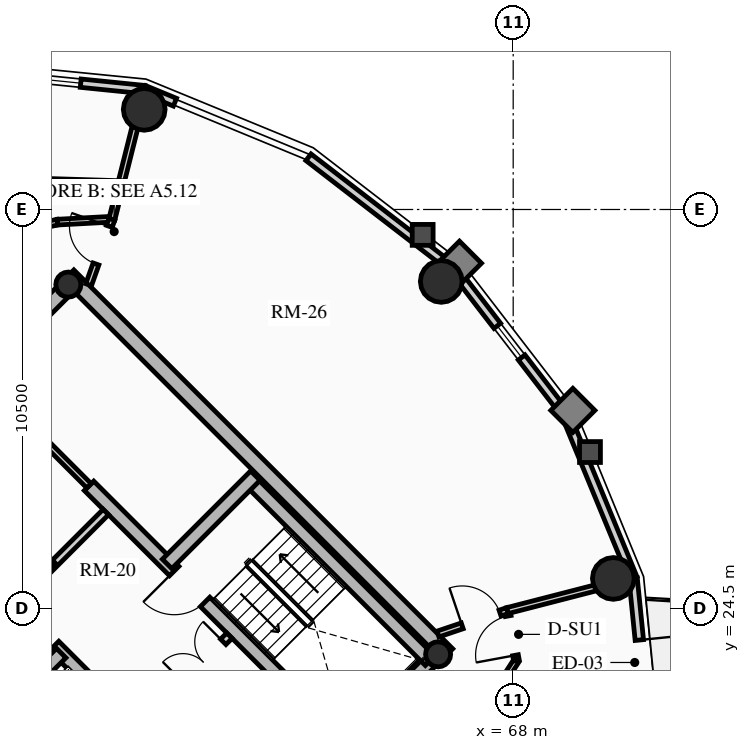
"""IFC4 building model, lengths in metres.
Left out: names, types, materials, properties, quantities, classifications, styles, units other than length and angle.
Written with IfcOpenShell. Run it as: python <this file> out.ifc"""

import sys

from ifc_helpers import new_model, si_unit, direction, frame, frame_2d, origin, origin_2d, place, context, subcontext, project, spatial, rectangle, circle, hollow_circle, extrude, source, transform, mapped, element, fill, save


model = new_model("IFC4")
c1 = context("Model", 3, precision=1e-05, world=origin(), true_north=direction((0.0, 1.0)))
c2 = subcontext(c1, "Body", "Model", "MODEL_VIEW")
j1 = project(units=[si_unit("LENGTHUNIT", "METRE"), si_unit("PLANEANGLEUNIT", "RADIAN")], contexts=[c1])
p1 = place(None, origin())
s1 = spatial("IfcSite", under=j1, at=p1, CompositionType="ELEMENT")
p2 = place(p1, origin())
s2 = spatial("IfcBuilding", under=s1, at=p2, CompositionType="ELEMENT")
p3 = place(p2, frame((0.0, 0.0, 214.12)))
s3 = spatial("IfcBuildingStorey", under=s2, at=p3, CompositionType="ELEMENT", Elevation=214.12)
for number, where, z_axis, x_axis in (
    (1, (58.702, 15.732, 0.0), (0.0, 0.0, 1.0), (-0.707, 0.707, 0.0)),
    (2, (66.268, 23.298, 0.0), (0.0, 0.0, 1.0), (-0.707, 0.707, 0.0)),
):
    element("IfcWall", number, at=place(p3, frame(where, z_axis=z_axis, x_axis=x_axis)), inside=s3, PredefinedType="SHEAR", context=c2, shape_type="SweptSolid", body=[
        extrude(rectangle(XDim=14.1, YDim=0.4, at=frame_2d((7.05, 0.0))), origin(), (0.0, 0.0, 1.0), 2.91),
    ])
p4 = place(p3, frame((58.561, 15.873, 0.0), z_axis=(0.0, 0.0, 1.0), x_axis=(0.707106781187, 0.707106781187, 0.0)))
e3 = element("IfcWall", 3, at=p4, inside=s3, PredefinedType="SHEAR", context=c2, shape_type="SweptSolid", body=[
    extrude(rectangle(XDim=10.7, YDim=0.4, at=frame_2d((5.35, 0.0))), origin(), (0.0, 0.0, 1.0), 2.91),
])
m1 = source(origin(), c2, "Body", "SweptSolid", [
    extrude(rectangle(XDim=1.5, YDim=2.02, at=frame_2d((0.75, 1.01))), frame((0.0, 0.21, 0.0), z_axis=(0.0, -1.0, 0.0), x_axis=(1.0, 0.0, 0.0)), (0.0, 0.0, 1.0), 0.42),
])
p5 = place(p4, frame((5.45, 0.0, 0.0)))
e4 = element("IfcOpeningElement", 4, at=p5, cuts=e3, PredefinedType="OPENING", context=c2, shape_type="MappedRepresentation", body=[
    mapped(m1, transform((0.0, 0.0, 0.0), x_axis=(1.0, 0.0, 0.0), y_axis=(0.0, 1.0, 0.0), z_axis=(0.0, 0.0, 1.0), scale=1.0)),
])
p6 = place(p3, frame((48.873, 25.561, 0.0), z_axis=(0.0, 0.0, 1.0), x_axis=(0.707106781187, 0.707106781187, 0.0)))
e5 = element("IfcWall", 5, at=p6, inside=s3, PredefinedType="SHEAR", context=c2, shape_type="SweptSolid", body=[
    extrude(rectangle(XDim=10.7, YDim=0.4, at=frame_2d((5.35, 0.0))), origin(), (0.0, 0.0, 1.0), 2.91),
])
p7 = place(p6, frame((4.6, 0.0, 0.0)))
e6 = element("IfcOpeningElement", 6, at=p7, cuts=e5, PredefinedType="OPENING", context=c2, shape_type="MappedRepresentation", body=[
    mapped(m1, transform((0.0, 0.0, 0.0), x_axis=(1.0, 0.0, 0.0), y_axis=(0.0, 1.0, 0.0), z_axis=(0.0, 0.0, 1.0), scale=1.0)),
])
p8 = place(p3, frame((61.06, 18.373, 0.0), z_axis=(0.0, 0.0, 1.0), x_axis=(-0.707106781187, 0.707106781187, 0.0)))
e7 = element("IfcWall", 7, at=p8, inside=s3, PredefinedType="SHEAR", context=c2, shape_type="SweptSolid", body=[
    extrude(rectangle(XDim=13.7, YDim=0.35, at=frame_2d((6.85, 0.0))), origin(), (0.0, 0.0, 1.0), 2.91),
])
m2 = source(origin(), c2, "Body", "SweptSolid", [
    extrude(rectangle(XDim=1.1, YDim=2.015, at=frame_2d((0.55, 1.007))), frame((0.0, 0.185, 0.0), z_axis=(0.0, -1.0, 0.0), x_axis=(1.0, 0.0, 0.0)), (0.0, 0.0, 1.0), 0.37),
])
p9 = place(p8, frame((4.85, 0.0, 0.0)))
e8 = element("IfcOpeningElement", 8, at=p9, cuts=e7, PredefinedType="OPENING", context=c2, shape_type="MappedRepresentation", body=[
    mapped(m2, transform((0.0, 0.0, 0.0), x_axis=(1.0, 0.0, 0.0), y_axis=(0.0, 1.0, 0.0), z_axis=(0.0, 0.0, 1.0), scale=1.0)),
])
p10 = place(p8, frame((0.625, 0.0, 0.0)))
e9 = element("IfcOpeningElement", 9, at=p10, cuts=e7, PredefinedType="OPENING", context=c2, shape_type="MappedRepresentation", body=[
    mapped(m2, transform((0.0, 0.0, 0.0), x_axis=(1.0, 0.0, 0.0), y_axis=(0.0, 1.0, 0.0), z_axis=(0.0, 0.0, 1.0), scale=1.0)),
])
p11 = place(p8, frame((2.625, 0.0, 0.0)))
e10 = element("IfcOpeningElement", 10, at=p11, cuts=e7, PredefinedType="OPENING", context=c2, shape_type="MappedRepresentation", body=[
    mapped(m2, transform((0.0, 0.0, 0.0), x_axis=(1.0, 0.0, 0.0), y_axis=(0.0, 1.0, 0.0), z_axis=(0.0, 0.0, 1.0), scale=1.0)),
])
m3 = source(origin(), c2, "Body", "SweptSolid", [
    extrude(rectangle(XDim=1.15, YDim=2.02, at=frame_2d((0.575, 1.01))), frame((0.0, 0.185, 0.0), z_axis=(0.0, -1.0, 0.0), x_axis=(1.0, 0.0, 0.0)), (0.0, 0.0, 1.0), 0.37),
])
p12 = place(p8, frame((7.27, 0.0, 0.0)))
e11 = element("IfcOpeningElement", 11, at=p12, cuts=e7, PredefinedType="OPENING", context=c2, shape_type="MappedRepresentation", body=[
    mapped(m3, transform((0.0, 0.0, 0.0), x_axis=(1.0, 0.0, 0.0), y_axis=(0.0, 1.0, 0.0), z_axis=(0.0, 0.0, 1.0), scale=1.0)),
])
p13 = place(p3, frame((63.627, 20.94, 0.0), z_axis=(0.0, 0.0, 1.0), x_axis=(-0.707119496762, 0.707094065383, 0.0)))
e12 = element("IfcWall", 12, at=p13, inside=s3, PredefinedType="SHEAR", context=c2, shape_type="SweptSolid", body=[
    extrude(rectangle(XDim=9.6, YDim=0.35, at=frame_2d((4.8, 0.0))), origin(), (0.0, 0.0, 1.0), 2.91),
])
p14 = place(p13, frame((5.28, 0.0, 0.0)))
e13 = element("IfcOpeningElement", 13, at=p14, cuts=e12, PredefinedType="OPENING", context=c2, shape_type="MappedRepresentation", body=[
    mapped(m3, transform((0.0, 0.0, 0.0), x_axis=(1.0, 0.0, 0.0), y_axis=(0.0, 1.0, 0.0), z_axis=(0.0, 0.0, 1.0), scale=1.0)),
])
p15 = place(p3, frame((53.784, 21.003, 0.0), z_axis=(0.0, 0.0, 1.0), x_axis=(0.707106781187, 0.707106781187, 0.0)))
e14 = element("IfcWall", 14, at=p15, inside=s3, PredefinedType="SHEAR", context=c2, shape_type="SweptSolid", body=[
    extrude(rectangle(XDim=3.285, YDim=0.35, at=frame_2d((1.643, 0.0))), origin(), (0.0, 0.0, 1.0), 2.91),
])
p16 = place(p3, frame((65.812, 23.125, 0.0), z_axis=(0.0, 0.0, 1.0), x_axis=(-0.707106781187, 0.707106781187, 0.0)))
e15 = element("IfcWall", 15, at=p16, inside=s3, PredefinedType="SHEAR", context=c2, shape_type="SweptSolid", body=[
    extrude(rectangle(XDim=6.695, YDim=0.35, at=frame_2d((3.348, 0.0))), origin(), (0.0, 0.0, 1.0), 2.91),
])
p17 = place(p3, frame((58.893, 25.674, 0.0), z_axis=(0.0, 0.0, 1.0), x_axis=(0.707106781187, 0.707106781187, 0.0)))
e16 = element("IfcWall", 16, at=p17, inside=s3, PredefinedType="SHEAR", context=c2, shape_type="SweptSolid", body=[
    extrude(rectangle(XDim=3.285, YDim=0.35, at=frame_2d((1.643, 0.0))), origin(), (0.0, 0.0, 1.0), 2.91),
])
for number, where, z_axis, x_axis in (
    (17, (66.024, 23.294, 0.0), (0.0, 0.0, 1.0), (0.707, 0.707, 0.0)),
    (18, (56.294, 33.024, 0.0), (0.0, 0.0, 1.0), (0.707, 0.707, 0.0)),
):
    element("IfcColumn", number, at=place(p3, frame(where, z_axis=z_axis, x_axis=x_axis)), inside=s3, PredefinedType="COLUMN", context=c2, shape_type="SweptSolid", body=[
        extrude(hollow_circle(Radius=0.33, WallThickness=0.025, at=origin_2d()), origin(), (0.0, 0.0, 1.0), 2.91),
    ])
for number, where, z_axis, x_axis in (
    (19, (66.107, 33.107, 0.0), (0.0, 0.0, 1.0), (1.0, 0.0, 0.0)),
    (20, (58.291, 37.635, 0.0), (0.0, 0.0, 1.0), (1.0, 0.0, 0.0)),
    (21, (70.635, 25.291, 0.0), (0.0, 0.0, 1.0), (1.0, 0.0, 0.0)),
):
    element("IfcColumn", number, at=place(p3, frame(where, z_axis=z_axis, x_axis=x_axis)), inside=s3, PredefinedType="USERDEFINED", context=c2, shape_type="SweptSolid", body=[
        extrude(circle(Radius=0.55, at=origin_2d()), origin(), (0.0, 0.0, 1.0), 2.91),
    ])
p18 = place(p3, frame((62.613, 36.374, 0.0), z_axis=(0.0, 0.0, 1.0), x_axis=(0.791998462147, -0.610523083886, 0.0)))
e22 = element("IfcWall", 22, at=p18, inside=s3, PredefinedType="SOLIDWALL", context=c2, shape_type="SweptSolid", body=[
    extrude(rectangle(XDim=4.82, YDim=0.22, at=frame_2d((2.41, 0.0))), origin(), (0.0, 0.0, 1.0), 2.322),
])
p19 = place(p3, frame((58.295, 38.155, 0.0), z_axis=(0.0, 0.0, 1.0), x_axis=(0.924515260676, -0.381145028536, 0.0)))
e23 = element("IfcWall", 23, at=p19, inside=s3, PredefinedType="SOLIDWALL", context=c2, shape_type="SweptSolid", body=[
    extrude(rectangle(XDim=0.87, YDim=0.22, at=frame_2d((0.435, 0.0))), origin(), (0.0, 0.0, 1.0), 2.322),
])
p20 = place(p3, frame((53.9, 38.599, 0.0), z_axis=(0.0, 0.0, 1.0), x_axis=(0.994929930991, -0.100570534541, 0.0)))
e24 = element("IfcWall", 24, at=p20, inside=s3, PredefinedType="SOLIDWALL", context=c2, shape_type="SweptSolid", body=[
    extrude(rectangle(XDim=4.418, YDim=0.22, at=frame_2d((2.209, 0.0))), origin(), (0.0, 0.0, 1.0), 2.322),
])
m4 = source(origin(), c2, "Body", "SweptSolid", [
    extrude(rectangle(XDim=1.05, YDim=1.3, at=frame_2d((0.525, 0.65))), frame((0.0, 0.12, 0.0), z_axis=(0.0, -1.0, 0.0), x_axis=(1.0, 0.0, 0.0)), (0.0, 0.0, 1.0), 0.24),
])
p21 = place(p20, frame((1.684, 0.0, 0.65)))
e25 = element("IfcOpeningElement", 25, at=p21, cuts=e24, PredefinedType="OPENING", context=c2, shape_type="MappedRepresentation", body=[
    mapped(m4, transform((0.0, 0.0, 0.0), x_axis=(1.0, 0.0, 0.0), y_axis=(0.0, 1.0, 0.0), z_axis=(0.0, 0.0, 1.0), scale=1.0)),
])
p22 = place(p3, frame((71.155, 25.295, 0.0), z_axis=(0.0, 0.0, 1.0), x_axis=(0.100570534541, -0.994929930991, 0.0)))
e26 = element("IfcWall", 26, at=p22, inside=s3, PredefinedType="SOLIDWALL", context=c2, shape_type="SweptSolid", body=[
    extrude(rectangle(XDim=4.418, YDim=0.22, at=frame_2d((2.209, 0.0))), origin(), (0.0, 0.0, 1.0), 2.322),
])
m5 = source(origin(), c2, "Body", "SweptSolid", [
    extrude(rectangle(XDim=1.15, YDim=2.005, at=frame_2d((0.575, 1.002))), frame((0.0, 0.12, 0.0), z_axis=(0.0, -1.0, 0.0), x_axis=(1.0, 0.0, 0.0)), (0.0, 0.0, 1.0), 0.24),
])
p23 = place(p22, frame((1.634, 0.0, 0.0)))
e27 = element("IfcOpeningElement", 27, at=p23, cuts=e26, PredefinedType="OPENING", context=c2, shape_type="MappedRepresentation", body=[
    mapped(m5, transform((0.0, 0.0, 0.0), x_axis=(1.0, 0.0, 0.0), y_axis=(0.0, 1.0, 0.0), z_axis=(0.0, 0.0, 1.0), scale=1.0)),
])
p24 = place(p3, frame((69.374, 29.613, 0.0), z_axis=(0.0, 0.0, 1.0), x_axis=(0.381309704956, -0.924447353237, 0.0)))
e28 = element("IfcWall", 28, at=p24, inside=s3, PredefinedType="SOLIDWALL", context=c2, shape_type="SweptSolid", body=[
    extrude(rectangle(XDim=4.671, YDim=0.22, at=frame_2d((2.335, 0.0))), origin(), (0.0, 0.0, 1.0), 2.322),
])
p25 = place(p3, frame((66.431, 33.431, 0.0), z_axis=(0.0, 0.0, 1.0), x_axis=(0.610523083886, -0.791998462147, 0.0)))
e29 = element("IfcWall", 29, at=p25, inside=s3, PredefinedType="SOLIDWALL", context=c2, shape_type="SweptSolid", body=[
    extrude(rectangle(XDim=4.82, YDim=0.22, at=frame_2d((2.41, 0.0))), origin(), (0.0, 0.0, 1.0), 2.322),
])
p26 = place(p25, frame((1.885, 0.0, 0.65)))
e30 = element("IfcOpeningElement", 30, at=p26, cuts=e29, PredefinedType="OPENING", context=c2, shape_type="MappedRepresentation", body=[
    mapped(m4, transform((0.0, 0.0, 0.0), x_axis=(1.0, 0.0, 0.0), y_axis=(0.0, 1.0, 0.0), z_axis=(0.0, 0.0, 1.0), scale=1.0)),
])
p27 = place(p3, frame((58.214, 21.467, 0.0), z_axis=(0.0, 0.0, 1.0), x_axis=(0.707106781187, 0.707106781187, 0.0)))
e31 = element("IfcWall", 31, at=p27, inside=s3, PredefinedType="PARTITIONING", context=c2, shape_type="SweptSolid", body=[
    extrude(rectangle(XDim=3.28, YDim=0.2, at=frame_2d((1.64, 0.0))), origin(), (0.0, 0.0, 1.0), 2.685),
])
m6 = source(origin(), c2, "Body", "SweptSolid", [
    extrude(rectangle(XDim=1.5, YDim=2.02, at=frame_2d((0.75, 1.01))), frame((0.0, 0.11, 0.0), z_axis=(0.0, -1.0, 0.0), x_axis=(1.0, 0.0, 0.0)), (0.0, 0.0, 1.0), 0.22),
])
p28 = place(p27, frame((1.55, 0.0, 0.0)))
e32 = element("IfcOpeningElement", 32, at=p28, cuts=e31, PredefinedType="OPENING", context=c2, shape_type="MappedRepresentation", body=[
    mapped(m6, transform((0.0, 0.0, 0.0), x_axis=(1.0, 0.0, 0.0), y_axis=(0.0, 1.0, 0.0), z_axis=(0.0, 0.0, 1.0), scale=1.0)),
])
p29 = place(p3, frame((54.961, 24.719, 0.0), z_axis=(0.0, 0.0, 1.0), x_axis=(0.707106781187, 0.707106781187, 0.0)))
e33 = element("IfcWall", 33, at=p29, inside=s3, PredefinedType="PARTITIONING", context=c2, shape_type="SweptSolid", body=[
    extrude(rectangle(XDim=3.28, YDim=0.2, at=frame_2d((1.64, 0.0))), origin(), (0.0, 0.0, 1.0), 2.685),
])
m7 = source(origin(), c2, "Body", "SweptSolid", [
    extrude(rectangle(XDim=0.9, YDim=2.005, at=frame_2d((0.45, 1.002))), frame((0.0, 0.11, 0.0), z_axis=(0.0, -1.0, 0.0), x_axis=(1.0, 0.0, 0.0)), (0.0, 0.0, 1.0), 0.22),
])
p30 = place(p29, frame((0.16, 0.0, 0.0)))
e34 = element("IfcOpeningElement", 34, at=p30, cuts=e33, PredefinedType="OPENING", context=c2, shape_type="MappedRepresentation", body=[
    mapped(m7, transform((0.0, 0.0, 0.0), x_axis=(1.0, 0.0, 0.0), y_axis=(0.0, 1.0, 0.0), z_axis=(0.0, 0.0, 1.0), scale=1.0)),
])
p31 = place(p3, frame((55.874, 25.631, 0.0), z_axis=(0.0, 0.0, 1.0), x_axis=(-0.707157639372, 0.707055919343, 0.0)))
e35 = element("IfcWall", 35, at=p31, inside=s3, PredefinedType="PARTITIONING", context=c2, shape_type="SweptSolid", body=[
    extrude(rectangle(XDim=2.4, YDim=0.2, at=frame_2d((1.2, 0.0))), origin(), (0.0, 0.0, 1.0), 2.685),
])
p32 = place(p3, frame((56.839, 27.728, 0.0), z_axis=(0.0, 0.0, 1.0), x_axis=(-0.707106781187, 0.707106781187, 0.0)))
e36 = element("IfcWall", 36, at=p32, inside=s3, PredefinedType="PARTITIONING", context=c2, shape_type="SweptSolid", body=[
    extrude(rectangle(XDim=3.9, YDim=0.16, at=frame_2d((1.95, 0.0))), origin(), (0.0, 0.0, 1.0), 2.685),
])
m8 = source(origin(), c2, "Body", "SweptSolid", [
    extrude(rectangle(XDim=0.9, YDim=2.005, at=frame_2d((0.45, 1.002))), frame((0.0, 0.09, 0.0), z_axis=(0.0, -1.0, 0.0), x_axis=(1.0, 0.0, 0.0)), (0.0, 0.0, 1.0), 0.18),
])
p33 = place(p32, frame((2.2, 0.0, 0.0)))
e37 = element("IfcOpeningElement", 37, at=p33, cuts=e36, PredefinedType="OPENING", context=c2, shape_type="MappedRepresentation", body=[
    mapped(m8, transform((0.0, 0.0, 0.0), x_axis=(1.0, 0.0, 0.0), y_axis=(0.0, 1.0, 0.0), z_axis=(0.0, 0.0, 1.0), scale=1.0)),
])
p34 = place(p3, frame((57.44, 34.744, 0.0), z_axis=(0.0, 0.0, 1.0), x_axis=(-0.998578025565, -0.053309725738, 0.0)))
e38 = element("IfcWall", 38, at=p34, inside=s3, PredefinedType="PARTITIONING", context=c2, shape_type="SweptSolid", body=[
    extrude(rectangle(XDim=1.433, YDim=0.15, at=frame_2d((0.717, 0.0))), origin(), (0.0, 0.0, 1.0), 2.322),
])
p35 = place(p3, frame((56.009, 34.667, 0.0), z_axis=(0.0, 0.0, 1.0), x_axis=(-0.977625498152, -0.210353001795, 0.0)))
e39 = element("IfcWall", 39, at=p35, inside=s3, PredefinedType="PARTITIONING", context=c2, shape_type="SweptSolid", body=[
    extrude(rectangle(XDim=1.538, YDim=0.15, at=frame_2d((0.769, 0.0))), origin(), (0.0, 0.0, 1.0), 2.255),
])
p36 = place(p3, frame((67.095, 21.6, 0.0), z_axis=(0.0, 0.0, 1.0), x_axis=(0.543773190184, 0.839232219137, 0.0)))
e40 = element("IfcWall", 40, at=p36, inside=s3, PredefinedType="PARTITIONING", context=c2, shape_type="SweptSolid", body=[
    extrude(rectangle(XDim=1.823, YDim=0.15, at=frame_2d((0.911, 0.0))), origin(), (0.0, 0.0, 1.0), 2.255),
])
p37 = place(p3, frame((68.086, 23.129, 0.0), z_axis=(0.0, 0.0, 1.0), x_axis=(-0.182004193146, 0.983297754334, 0.0)))
e41 = element("IfcWall", 41, at=p37, inside=s3, PredefinedType="PARTITIONING", context=c2, shape_type="SweptSolid", body=[
    extrude(rectangle(XDim=1.336, YDim=0.15, at=frame_2d((0.668, 0.0))), origin(), (0.0, 0.0, 1.0), 2.322),
])
m9 = source(origin(), c2, "Body", "SweptSolid", [
    extrude(rectangle(XDim=1.05, YDim=2.015, at=frame_2d((0.525, 1.007))), frame((0.0, 0.085, 0.0), z_axis=(0.0, -1.0, 0.0), x_axis=(1.0, 0.0, 0.0)), (0.0, 0.0, 1.0), 0.17),
])
p38 = place(p37, frame((0.143, 0.0, 0.0)))
e42 = element("IfcOpeningElement", 42, at=p38, cuts=e41, PredefinedType="OPENING", context=c2, shape_type="MappedRepresentation", body=[
    mapped(m9, transform((0.0, 0.0, 0.0), x_axis=(1.0, 0.0, 0.0), y_axis=(0.0, 1.0, 0.0), z_axis=(0.0, 0.0, 1.0), scale=1.0)),
])
p39 = place(p3, frame((57.44, 34.744, 0.0), z_axis=(0.0, 0.0, 1.0), x_axis=(0.243619816457, 0.969870808422, 0.0)))
e43 = element("IfcWall", 43, at=p39, inside=s3, PredefinedType="PARTITIONING", context=c2, shape_type="SweptSolid", body=[
    extrude(rectangle(XDim=3.496, YDim=0.16, at=frame_2d((1.748, 0.0))), origin(), (0.0, 0.0, 1.0), 2.322),
])
p40 = place(p3, frame((67.843, 24.443, 0.0), z_axis=(0.0, 0.0, 1.0), x_axis=(0.968303102463, 0.249778105048, 0.0)))
e44 = element("IfcWall", 44, at=p40, inside=s3, PredefinedType="PARTITIONING", context=c2, shape_type="SweptSolid", body=[
    extrude(rectangle(XDim=3.399, YDim=0.16, at=frame_2d((1.7, 0.0))), origin(), (0.0, 0.0, 1.0), 2.322),
])
p41 = place(p3, frame((56.828, 33.021, 0.0), z_axis=(0.0, 0.0, 1.0), x_axis=(0.334788446034, 0.942293317605, 0.0)))
e45 = element("IfcWall", 45, at=p41, inside=s3, PredefinedType="PARTITIONING", context=c2, shape_type="SweptSolid", body=[
    extrude(rectangle(XDim=1.829, YDim=0.16, at=frame_2d((0.915, 0.0))), origin(), (0.0, 0.0, 1.0), 2.255),
])
m10 = source(origin(), c2, "Body", "SweptSolid", [
    extrude(rectangle(XDim=1.05, YDim=2.015, at=frame_2d((0.525, 1.007))), frame((0.0, 0.09, 0.0), z_axis=(0.0, -1.0, 0.0), x_axis=(1.0, 0.0, 0.0)), (0.0, 0.0, 1.0), 0.18),
])
p42 = place(p41, frame((0.579, 0.0, 0.0)))
e46 = element("IfcOpeningElement", 46, at=p42, cuts=e45, PredefinedType="OPENING", context=c2, shape_type="MappedRepresentation", body=[
    mapped(m10, transform((0.0, 0.0, 0.0), x_axis=(1.0, 0.0, 0.0), y_axis=(0.0, 1.0, 0.0), z_axis=(0.0, 0.0, 1.0), scale=1.0)),
])
p43 = place(p3, frame((66.021, 23.828, 0.0), z_axis=(0.0, 0.0, 1.0), x_axis=(0.947522075691, 0.319690344049, 0.0)))
e47 = element("IfcWall", 47, at=p43, inside=s3, PredefinedType="PARTITIONING", context=c2, shape_type="SweptSolid", body=[
    extrude(rectangle(XDim=1.924, YDim=0.16, at=frame_2d((0.962, 0.0))), origin(), (0.0, 0.0, 1.0), 2.255),
])
p44 = place(p43, frame((0.674, 0.0, 0.0)))
e48 = element("IfcOpeningElement", 48, at=p44, cuts=e47, PredefinedType="OPENING", context=c2, shape_type="MappedRepresentation", body=[
    mapped(m10, transform((0.0, 0.0, 0.0), x_axis=(1.0, 0.0, 0.0), y_axis=(0.0, 1.0, 0.0), z_axis=(0.0, 0.0, 1.0), scale=1.0)),
])
p45 = place(p3, frame((57.679, 35.693, 0.0), z_axis=(0.0, 0.0, 1.0), x_axis=(-0.999526298938, 0.030776252722, 0.0)))
e49 = element("IfcWall", 49, at=p45, inside=s3, PredefinedType="PARTITIONING", context=c2, shape_type="SweptSolid", body=[
    extrude(rectangle(XDim=2.261, YDim=0.125, at=frame_2d((1.13, 0.0))), origin(), (0.0, 0.0, 1.0), 2.322),
])
m11 = source(origin(), c2, "Body", "SweptSolid", [
    extrude(rectangle(XDim=1.05, YDim=1.3, at=frame_2d((0.525, 0.65))), frame((0.0, 0.03, 0.0), z_axis=(0.0, -1.0, 0.0), x_axis=(1.0, 0.0, 0.0)), (0.0, 0.0, 1.0), 0.06),
])
p46 = place(p21, origin())
e50 = element("IfcWindow", 50, at=p46, inside=s3, PartitioningType="SINGLE_PANEL", PredefinedType="WINDOW", context=c2, shape_type="MappedRepresentation", body=[
    mapped(m11, transform((0.0, 0.0, 0.0), x_axis=(1.0, 0.0, 0.0), y_axis=(0.0, 1.0, 0.0), z_axis=(0.0, 0.0, 1.0), scale=1.0)),
])
fill(e25, e50)
m12 = source(origin(), c2, "Body", "SweptSolid", [
    extrude(rectangle(XDim=1.15, YDim=2.005, at=frame_2d((0.575, 1.002))), frame((0.0, 0.025, 0.0), z_axis=(0.0, -1.0, 0.0), x_axis=(1.0, 0.0, 0.0)), (0.0, 0.0, 1.0), 0.05),
])
p47 = place(p23, origin())
e51 = element("IfcDoor", 51, at=p47, inside=s3, OperationType="SINGLE_SWING_LEFT", PredefinedType="DOOR", context=c2, shape_type="MappedRepresentation", body=[
    mapped(m12, transform((0.0, 0.0, 0.0), x_axis=(1.0, 0.0, 0.0), y_axis=(0.0, 1.0, 0.0), z_axis=(0.0, 0.0, 1.0), scale=1.0)),
])
fill(e27, e51)
p48 = place(p26, origin())
e52 = element("IfcWindow", 52, at=p48, inside=s3, PartitioningType="SINGLE_PANEL", PredefinedType="WINDOW", context=c2, shape_type="MappedRepresentation", body=[
    mapped(m11, transform((0.0, 0.0, 0.0), x_axis=(1.0, 0.0, 0.0), y_axis=(0.0, 1.0, 0.0), z_axis=(0.0, 0.0, 1.0), scale=1.0)),
])
fill(e30, e52)
m13 = source(origin(), c2, "Body", "SweptSolid", [
    extrude(rectangle(XDim=1.15, YDim=2.02, at=frame_2d((0.575, 1.01))), frame((0.0, 0.025, 0.0), z_axis=(0.0, -1.0, 0.0), x_axis=(1.0, 0.0, 0.0)), (0.0, 0.0, 1.0), 0.05),
])
p49 = place(p12, origin())
e53 = element("IfcDoor", 53, at=p49, inside=s3, OperationType="SINGLE_SWING_LEFT", PredefinedType="DOOR", context=c2, shape_type="MappedRepresentation", body=[
    mapped(m13, transform((0.0, 0.0, 0.0), x_axis=(1.0, 0.0, 0.0), y_axis=(0.0, 1.0, 0.0), z_axis=(0.0, 0.0, 1.0), scale=1.0)),
])
fill(e11, e53)
p50 = place(p14, origin())
e54 = element("IfcDoor", 54, at=p50, inside=s3, OperationType="SINGLE_SWING_RIGHT", PredefinedType="DOOR", context=c2, shape_type="MappedRepresentation", body=[
    mapped(m13, transform((0.0, 0.0, 0.0), x_axis=(1.0, 0.0, 0.0), y_axis=(0.0, 1.0, 0.0), z_axis=(0.0, 0.0, 1.0), scale=1.0)),
])
fill(e13, e54)
m14 = source(origin(), c2, "Body", "SweptSolid", [
    extrude(rectangle(XDim=1.5, YDim=2.02, at=frame_2d((0.75, 1.01))), frame((0.0, 0.025, 0.0), z_axis=(0.0, -1.0, 0.0), x_axis=(1.0, 0.0, 0.0)), (0.0, 0.0, 1.0), 0.05),
])
p51 = place(p28, origin())
e55 = element("IfcDoor", 55, at=p51, inside=s3, OperationType="DOUBLE_DOOR_SINGLE_SWING", PredefinedType="DOOR", context=c2, shape_type="MappedRepresentation", body=[
    mapped(m14, transform((0.0, 0.0, 0.0), x_axis=(1.0, 0.0, 0.0), y_axis=(0.0, 1.0, 0.0), z_axis=(0.0, 0.0, 1.0), scale=1.0)),
])
fill(e32, e55)
m15 = source(origin(), c2, "Body", "SweptSolid", [
    extrude(rectangle(XDim=1.05, YDim=2.015, at=frame_2d((0.525, 1.007))), frame((0.0, 0.025, 0.0), z_axis=(0.0, -1.0, 0.0), x_axis=(1.0, 0.0, 0.0)), (0.0, 0.0, 1.0), 0.05),
])
p52 = place(p42, origin())
e56 = element("IfcDoor", 56, at=p52, inside=s3, OperationType="SINGLE_SWING_RIGHT", PredefinedType="DOOR", context=c2, shape_type="MappedRepresentation", body=[
    mapped(m15, transform((0.0, 0.0, 0.0), x_axis=(1.0, 0.0, 0.0), y_axis=(0.0, 1.0, 0.0), z_axis=(0.0, 0.0, 1.0), scale=1.0)),
])
fill(e46, e56)
p53 = place(p44, origin())
e57 = element("IfcDoor", 57, at=p53, inside=s3, OperationType="SINGLE_SWING_LEFT", PredefinedType="DOOR", context=c2, shape_type="MappedRepresentation", body=[
    mapped(m15, transform((0.0, 0.0, 0.0), x_axis=(1.0, 0.0, 0.0), y_axis=(0.0, 1.0, 0.0), z_axis=(0.0, 0.0, 1.0), scale=1.0)),
])
fill(e48, e57)
p54 = place(p38, origin())
e58 = element("IfcDoor", 58, at=p54, inside=s3, OperationType="SINGLE_SWING_LEFT", PredefinedType="DOOR", context=c2, shape_type="MappedRepresentation", body=[
    mapped(m15, transform((0.0, 0.0, 0.0), x_axis=(1.0, 0.0, 0.0), y_axis=(0.0, 1.0, 0.0), z_axis=(0.0, 0.0, 1.0), scale=1.0)),
])
fill(e42, e58)
save(model, sys.argv[1])
